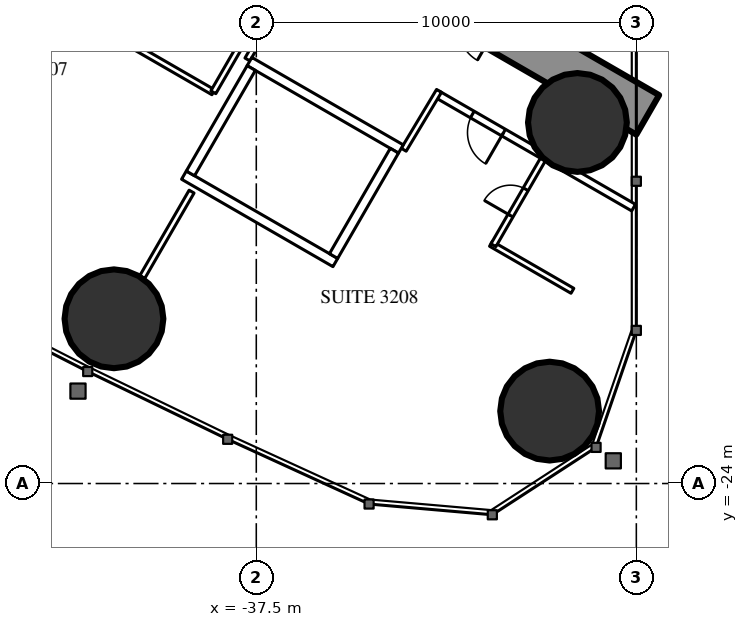
"""IFC4 building model, lengths in metres.
Left out: names, types, materials, properties, quantities, classifications, styles, units other than length and angle.
Written with IfcOpenShell. Run it as: python <this file> out.ifc"""

import sys

from ifc_helpers import new_model, si_unit, direction, frame, frame_2d, origin, origin_2d, place, context, subcontext, project, spatial, rectangle, hollow_circle, extrude, element, fill, save


model = new_model("IFC4")
c1 = context("Model", 3, precision=1e-05, world=origin(), true_north=direction((0.0, 1.0)))
c2 = subcontext(c1, "Body", "Model", "MODEL_VIEW")
j1 = project(units=[si_unit("LENGTHUNIT", "METRE"), si_unit("PLANEANGLEUNIT", "RADIAN")], contexts=[c1])
p1 = place(None, origin())
s1 = spatial("IfcSite", under=j1, at=p1, CompositionType="ELEMENT")
p2 = place(p1, origin())
s2 = spatial("IfcBuilding", under=s1, at=p2, CompositionType="ELEMENT")
p3 = place(p2, frame((0.0, 0.0, 122.1)))
s3 = spatial("IfcBuildingStorey", under=s2, at=p3, CompositionType="ELEMENT", Elevation=122.1)
for number, where, z_axis, x_axis in (
    (1, (-29.781, -22.095, 0.0), (0.0, 0.0, 1.0), (1.0, 0.0, 0.0)),
    (2, (-29.05, -14.5, 0.0), (0.0, 0.0, 1.0), (1.0, 0.0, 0.0)),
    (3, (-41.245, -19.666, 0.0), (0.0, 0.0, 1.0), (1.0, 0.0, 0.0)),
):
    element("IfcColumn", number, at=place(p3, frame(where, z_axis=z_axis, x_axis=x_axis)), inside=s3, PredefinedType="COLUMN", context=c2, shape_type="SweptSolid", body=[
        extrude(hollow_circle(Radius=1.3, WallThickness=0.1, at=origin_2d()), origin(), (0.0, 0.0, 1.0), 3.5),
    ])
p4 = place(p3, frame((-27.2, -14.3, 0.0), z_axis=(0.0, 0.0, 1.0), x_axis=(-0.866024021859, 0.500002393557, 0.0)))
e4 = element("IfcWall", 4, at=p4, inside=s3, PredefinedType="SHEAR", context=c2, shape_type="SweptSolid", body=[
    extrude(rectangle(XDim=27.907, YDim=1.2, at=frame_2d((13.954, 0.0))), origin(), (0.0, 0.0, 1.0), 3.5),
])
p5 = place(p4, frame((4.6, 0.0, 0.0)))
e5 = element("IfcOpeningElement", 5, at=p5, cuts=e4, PredefinedType="OPENING", context=c2, shape_type="SweptSolid", body=[
    extrude(rectangle(XDim=1.0, YDim=2.2, at=frame_2d((0.5, 1.1))), frame((0.0, 0.61, 0.0), z_axis=(0.0, -1.0, 0.0), x_axis=(1.0, 0.0, 0.0)), (0.0, 0.0, 1.0), 1.22),
])
p6 = place(p4, frame((13.395, 0.0, 0.0)))
e6 = element("IfcOpeningElement", 6, at=p6, cuts=e4, PredefinedType="OPENING", context=c2, shape_type="SweptSolid", body=[
    extrude(rectangle(XDim=1.8, YDim=2.2, at=frame_2d((0.9, 1.1))), frame((0.0, 0.61, 0.0), z_axis=(0.0, -1.0, 0.0), x_axis=(1.0, 0.0, 0.0)), (0.0, 0.0, 1.0), 1.22),
])
p7 = place(p3, frame((-39.202, -16.32, 0.0), z_axis=(0.0, 0.0, 1.0), x_axis=(-0.49997716683, -0.86603858612, 0.0)))
e7 = element("IfcWall", 7, at=p7, inside=s3, PredefinedType="PARTITIONING", context=c2, shape_type="SweptSolid", body=[
    extrude(rectangle(XDim=2.6, YDim=0.15, at=frame_2d((1.3, 0.0))), origin(), (0.0, 0.0, 1.0), 3.25),
])
p8 = place(p3, frame((-27.572, -16.741, 0.0), z_axis=(0.0, 0.0, 1.0), x_axis=(-0.866024464444, 0.500001626982, 0.0)))
e8 = element("IfcWall", 8, at=p8, inside=s3, PredefinedType="PARTITIONING", context=c2, shape_type="SweptSolid", body=[
    extrude(rectangle(XDim=5.955, YDim=0.2, at=frame_2d((2.978, 0.0))), origin(), (0.0, 0.0, 1.0), 3.25),
])
p9 = place(p8, frame((3.95, 0.0, 0.0)))
e9 = element("IfcOpeningElement", 9, at=p9, cuts=e8, PredefinedType="OPENING", context=c2, shape_type="SweptSolid", body=[
    extrude(rectangle(XDim=0.95, YDim=2.2, at=frame_2d((0.475, 1.1))), frame((0.0, 0.11, 0.0), z_axis=(0.0, -1.0, 0.0), x_axis=(1.0, 0.0, 0.0)), (0.0, 0.0, 1.0), 0.22),
])
p10 = place(p3, frame((-36.831, -11.28, 0.0), z_axis=(0.0, 0.0, 1.0), x_axis=(-0.499937177781, -0.866061671171, 0.0)))
e10 = element("IfcWall", 10, at=p10, inside=s3, PredefinedType="PARTITIONING", context=c2, shape_type="SweptSolid", body=[
    extrude(rectangle(XDim=1.804, YDim=0.15, at=frame_2d((0.902, 0.0))), origin(), (0.0, 0.0, 1.0), 3.25),
])
p11 = place(p3, frame((-33.621, -15.218, 0.0), z_axis=(0.0, 0.0, 1.0), x_axis=(0.514336634837, 0.857588377991, 0.0)))
e11 = element("IfcWall", 11, at=p11, inside=s3, PredefinedType="PARTITIONING", context=c2, shape_type="SweptSolid", body=[
    extrude(rectangle(XDim=1.805, YDim=0.15, at=frame_2d((0.903, 0.0))), origin(), (0.0, 0.0, 1.0), 3.25),
])
p12 = place(p3, frame((-38.63, -13.705, 0.0), z_axis=(0.0, 0.0, 1.0), x_axis=(-0.866018712932, 0.500011588718, 0.0)))
e12 = element("IfcWall", 12, at=p12, inside=s3, PredefinedType="PARTITIONING", context=c2, shape_type="SweptSolid", body=[
    extrude(rectangle(XDim=2.875, YDim=0.15, at=frame_2d((1.438, 0.0))), origin(), (0.0, 0.0, 1.0), 3.25),
])
p13 = place(p3, frame((-37.23, -11.281, 0.0), z_axis=(0.0, 0.0, 1.0), x_axis=(-0.500049511043, -0.865996816683, 0.0)))
e13 = element("IfcWall", 13, at=p13, inside=s3, PredefinedType="PARTITIONING", context=c2, shape_type="SweptSolid", body=[
    extrude(rectangle(XDim=2.8, YDim=0.15, at=frame_2d((1.4, 0.0))), origin(), (0.0, 0.0, 1.0), 3.25),
])
p14 = place(p3, frame((-29.182, -18.929, 0.0), z_axis=(0.0, 0.0, 1.0), x_axis=(-0.866006523861, 0.500032699561, 0.0)))
e14 = element("IfcWall", 14, at=p14, inside=s3, PredefinedType="PARTITIONING", context=c2, shape_type="SweptSolid", body=[
    extrude(rectangle(XDim=2.475, YDim=0.15, at=frame_2d((1.237, 0.0))), origin(), (0.0, 0.0, 1.0), 3.25),
])
p15 = place(p3, frame((-29.96, -15.478, 0.0), z_axis=(0.0, 0.0, 1.0), x_axis=(-0.500006934395, -0.866021400173, 0.0)))
e15 = element("IfcWall", 15, at=p15, inside=s3, PredefinedType="PARTITIONING", context=c2, shape_type="SweptSolid", body=[
    extrude(rectangle(XDim=2.6, YDim=0.15, at=frame_2d((1.3, 0.0))), origin(), (0.0, 0.0, 1.0), 3.25),
])
p16 = place(p15, frame((0.9, 0.0, 0.0)))
e16 = element("IfcOpeningElement", 16, at=p16, cuts=e15, PredefinedType="OPENING", context=c2, shape_type="SweptSolid", body=[
    extrude(rectangle(XDim=0.8, YDim=2.2, at=frame_2d((0.4, 1.1))), frame((0.0, 0.085, 0.0), z_axis=(0.0, -1.0, 0.0), x_axis=(1.0, 0.0, 0.0)), (0.0, 0.0, 1.0), 0.17),
])
p17 = place(p3, frame((-33.696, -15.197, 0.0), z_axis=(0.0, 0.0, 1.0), x_axis=(-0.865976953817, 0.500083908417, 0.0)))
e17 = element("IfcWall", 17, at=p17, inside=s3, PredefinedType="PARTITIONING", context=c2, shape_type="SweptSolid", body=[
    extrude(rectangle(XDim=4.599, YDim=0.25, at=frame_2d((2.3, 0.0))), origin(), (0.0, 0.0, 1.0), 3.25),
])
p18 = place(p3, frame((-35.42, -18.186, 0.0), z_axis=(0.0, 0.0, 1.0), x_axis=(-0.865990227814, 0.50006092162, 0.0)))
e18 = element("IfcWall", 18, at=p18, inside=s3, PredefinedType="PARTITIONING", context=c2, shape_type="SweptSolid", body=[
    extrude(rectangle(XDim=4.6, YDim=0.25, at=frame_2d((2.3, 0.0))), origin(), (0.0, 0.0, 1.0), 3.25),
])
p19 = place(p3, frame((-33.866, -15.243, 0.0), z_axis=(0.0, 0.0, 1.0), x_axis=(-0.499929347863, -0.866066190972, 0.0)))
e19 = element("IfcWall", 19, at=p19, inside=s3, PredefinedType="PARTITIONING", context=c2, shape_type="SweptSolid", body=[
    extrude(rectangle(XDim=3.201, YDim=0.25, at=frame_2d((1.6, 0.0))), origin(), (0.0, 0.0, 1.0), 3.25),
])
p20 = place(p3, frame((-37.633, -13.068, 0.0), z_axis=(0.0, 0.0, 1.0), x_axis=(-0.499872130319, -0.866099216793, 0.0)))
e20 = element("IfcWall", 20, at=p20, inside=s3, PredefinedType="PARTITIONING", context=c2, shape_type="SweptSolid", body=[
    extrude(rectangle(XDim=3.2, YDim=0.25, at=frame_2d((1.6, 0.0))), origin(), (0.0, 0.0, 1.0), 3.25),
])
p21 = place(p16, origin())
e21 = element("IfcDoor", 21, at=p21, inside=s3, OperationType="SINGLE_SWING_RIGHT", PredefinedType="DOOR", context=c2, shape_type="SweptSolid", body=[
    extrude(rectangle(XDim=0.8, YDim=2.2, at=frame_2d((0.4, 1.1))), frame((0.0, 0.025, 0.0), z_axis=(0.0, -1.0, 0.0), x_axis=(1.0, 0.0, 0.0)), (0.0, 0.0, 1.0), 0.05),
])
fill(e16, e21)
p22 = place(p9, origin())
e22 = element("IfcDoor", 22, at=p22, inside=s3, OperationType="SINGLE_SWING_LEFT", PredefinedType="DOOR", context=c2, shape_type="SweptSolid", body=[
    extrude(rectangle(XDim=0.95, YDim=2.2, at=frame_2d((0.475, 1.1))), frame((0.0, 0.025, 0.0), z_axis=(0.0, -1.0, 0.0), x_axis=(1.0, 0.0, 0.0)), (0.0, 0.0, 1.0), 0.05),
])
fill(e9, e22)
save(model, sys.argv[1])
